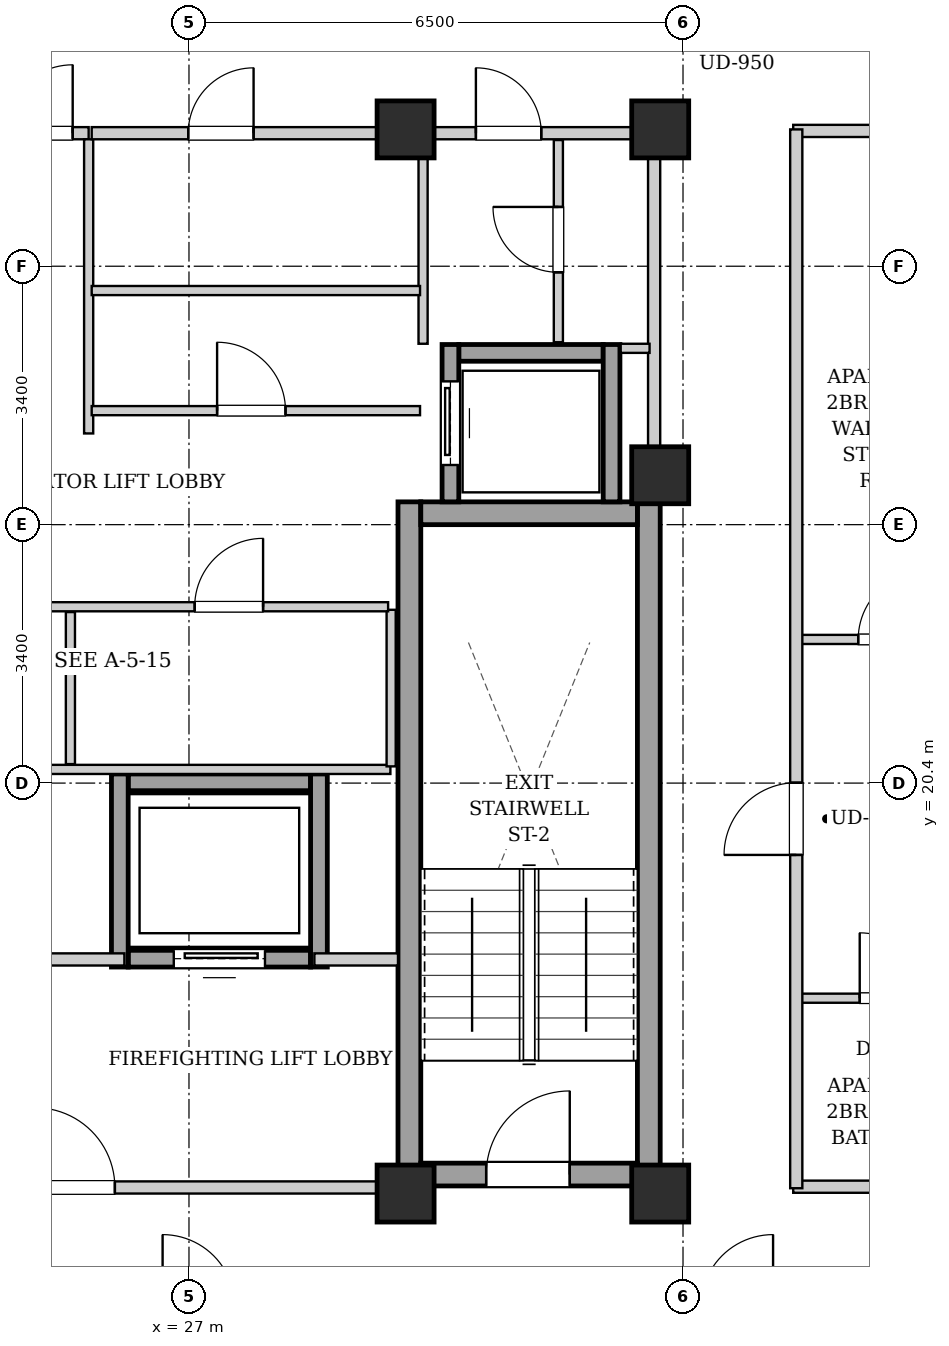
"""IFC4 building model, lengths in metres.
Left out: names, types, materials, properties, quantities, classifications, styles, units other than length and angle.
Written with IfcOpenShell. Run it as: python <this file> out.ifc"""

import sys

from ifc_helpers import new_model, si_unit, direction, frame, frame_2d, origin, origin_2d, place, context, subcontext, project, spatial, rectangle, extrude, element, fill, save


model = new_model("IFC4")
c1 = context("Model", 3, precision=1e-05, world=origin(), true_north=direction((0.0, 1.0)))
c2 = subcontext(c1, "Body", "Model", "MODEL_VIEW")
j1 = project(units=[si_unit("LENGTHUNIT", "METRE"), si_unit("PLANEANGLEUNIT", "RADIAN")], contexts=[c1])
p1 = place(None, origin())
s1 = spatial("IfcSite", under=j1, at=p1, CompositionType="ELEMENT")
p2 = place(p1, origin())
s2 = spatial("IfcBuilding", under=s1, at=p2, CompositionType="ELEMENT")
p3 = place(p2, frame((0.0, 0.0, 251.3)))
s3 = spatial("IfcBuildingStorey", under=s2, at=p3, CompositionType="ELEMENT", Elevation=251.3)
for number, where, z_axis, x_axis in (
    (1, (29.85, 15.0, 0.0), (0.0, 0.0, 1.0), (1.0, 0.0, 0.0)),
    (2, (33.2, 15.0, 0.0), (0.0, 0.0, 1.0), (1.0, 0.0, 0.0)),
    (3, (29.85, 29.0, 0.0), (0.0, 0.0, 1.0), (1.0, 0.0, 0.0)),
    (4, (33.2, 29.0, 0.0), (0.0, 0.0, 1.0), (1.0, 0.0, 0.0)),
    (5, (33.2, 24.45, 0.0), (0.0, 0.0, 1.0), (1.0, 0.0, 0.0)),
):
    element("IfcColumn", number, at=place(p3, frame(where, z_axis=z_axis, x_axis=x_axis)), inside=s3, PredefinedType="COLUMN", context=c2, shape_type="SweptSolid", body=[
        extrude(rectangle(XDim=0.75, YDim=0.75, at=origin_2d()), origin(), (0.0, 0.0, 1.0), 3.4),
    ])
for number, where, z_axis, x_axis in (
    (6, (29.9, 15.1, 0.0), (0.0, 0.0, 1.0), (0.0, 1.0, 0.0)),
    (7, (33.05, 15.1, 0.0), (0.0, 0.0, 1.0), (0.0, 1.0, 0.0)),
):
    element("IfcWall", number, at=place(p3, frame(where, z_axis=z_axis, x_axis=x_axis)), inside=s3, PredefinedType="SHEAR", context=c2, shape_type="SweptSolid", body=[
        extrude(rectangle(XDim=9.0, YDim=0.3, at=frame_2d((4.5, 0.0))), origin(), (0.0, 0.0, 1.0), 3.14),
    ])
p4 = place(p3, frame((30.05, 23.95, 0.0), z_axis=(0.0, 0.0, 1.0), x_axis=(1.0, 0.0, 0.0)))
e8 = element("IfcWall", 8, at=p4, inside=s3, PredefinedType="SHEAR", context=c2, shape_type="SweptSolid", body=[
    extrude(rectangle(XDim=2.85, YDim=0.3, at=frame_2d((1.425, 0.0))), origin(), (0.0, 0.0, 1.0), 3.14),
])
p5 = place(p3, frame((30.05, 15.25, 0.0), z_axis=(0.0, 0.0, 1.0), x_axis=(1.0, 0.0, 0.0)))
e9 = element("IfcWall", 9, at=p5, inside=s3, PredefinedType="SHEAR", context=c2, shape_type="SweptSolid", body=[
    extrude(rectangle(XDim=2.85, YDim=0.3, at=frame_2d((1.425, 0.0))), origin(), (0.0, 0.0, 1.0), 3.14),
])
p6 = place(p5, frame((0.86, 0.0, 0.0)))
e10 = element("IfcOpeningElement", 10, at=p6, cuts=e9, PredefinedType="OPENING", context=c2, shape_type="SweptSolid", body=[
    extrude(rectangle(XDim=1.1, YDim=2.05, at=frame_2d((0.55, 1.025))), frame((0.0, 0.16, 0.0), z_axis=(0.0, -1.0, 0.0), x_axis=(1.0, 0.0, 0.0)), (0.0, 0.0, 1.0), 0.32),
])
p7 = place(p3, frame((30.55, 26.06, 0.0), z_axis=(0.0, 0.0, 1.0), x_axis=(1.0, 0.0, 0.0)))
e11 = element("IfcWall", 11, at=p7, inside=s3, PredefinedType="SHEAR", context=c2, shape_type="SweptSolid", body=[
    extrude(rectangle(XDim=1.9, YDim=0.22, at=frame_2d((0.95, 0.0))), origin(), (0.0, 0.0, 1.0), 3.14),
])
p8 = place(p3, frame((30.44, 24.1, 0.0), z_axis=(0.0, 0.0, 1.0), x_axis=(0.0, 1.0, 0.0)))
e12 = element("IfcWall", 12, at=p8, inside=s3, PredefinedType="SHEAR", context=c2, shape_type="SweptSolid", body=[
    extrude(rectangle(XDim=2.07, YDim=0.22, at=frame_2d((1.035, 0.0))), origin(), (0.0, 0.0, 1.0), 3.14),
])
p9 = place(p8, frame((0.485, 0.0, 0.0)))
e13 = element("IfcOpeningElement", 13, at=p9, cuts=e12, PredefinedType="OPENING", context=c2, shape_type="SweptSolid", body=[
    extrude(rectangle(XDim=1.1, YDim=2.15, at=frame_2d((0.55, 1.075))), frame((0.0, 0.12, 0.0), z_axis=(0.0, -1.0, 0.0), x_axis=(1.0, 0.0, 0.0)), (0.0, 0.0, 1.0), 0.24),
])
p10 = place(p3, frame((32.56, 24.1, 0.0), z_axis=(0.0, 0.0, 1.0), x_axis=(0.0, 1.0, 0.0)))
e14 = element("IfcWall", 14, at=p10, inside=s3, PredefinedType="SHEAR", context=c2, shape_type="SweptSolid", body=[
    extrude(rectangle(XDim=2.07, YDim=0.22, at=frame_2d((1.035, 0.0))), origin(), (0.0, 0.0, 1.0), 3.14),
])
p11 = place(p3, frame((26.2, 18.09, 0.0), z_axis=(0.0, 0.0, 1.0), x_axis=(1.0, 0.0, 0.0)))
e15 = element("IfcWall", 15, at=p11, inside=s3, PredefinedType="SHEAR", context=c2, shape_type="SweptSolid", body=[
    extrude(rectangle(XDim=2.4, YDim=0.22, at=frame_2d((1.2, 0.0))), origin(), (0.0, 0.0, 1.0), 3.14),
])
p12 = place(p11, frame((0.6, 0.0, 0.0)))
e16 = element("IfcOpeningElement", 16, at=p12, cuts=e15, PredefinedType="OPENING", context=c2, shape_type="SweptSolid", body=[
    extrude(rectangle(XDim=1.2, YDim=2.15, at=frame_2d((0.6, 1.075))), frame((0.0, 0.12, 0.0), z_axis=(0.0, -1.0, 0.0), x_axis=(1.0, 0.0, 0.0)), (0.0, 0.0, 1.0), 0.24),
])
p13 = place(p3, frame((26.2, 20.41, 0.0), z_axis=(0.0, 0.0, 1.0), x_axis=(1.0, 0.0, 0.0)))
e17 = element("IfcWall", 17, at=p13, inside=s3, PredefinedType="SHEAR", context=c2, shape_type="SweptSolid", body=[
    extrude(rectangle(XDim=2.4, YDim=0.22, at=frame_2d((1.2, 0.0))), origin(), (0.0, 0.0, 1.0), 3.14),
])
for number, where, z_axis, x_axis in (
    (18, (26.09, 17.98, 0.0), (0.0, 0.0, 1.0), (0.0, 1.0, 0.0)),
    (19, (28.71, 17.98, 0.0), (0.0, 0.0, 1.0), (0.0, 1.0, 0.0)),
):
    element("IfcWall", number, at=place(p3, frame(where, z_axis=z_axis, x_axis=x_axis)), inside=s3, PredefinedType="SHEAR", context=c2, shape_type="SweptSolid", body=[
        extrude(rectangle(XDim=2.54, YDim=0.22, at=frame_2d((1.27, 0.0))), origin(), (0.0, 0.0, 1.0), 3.14),
    ])
p14 = place(p3, frame((21.25, 15.08, 0.0), z_axis=(0.0, 0.0, 1.0), x_axis=(1.0, 0.0, 0.0)))
e20 = element("IfcWall", 20, at=p14, inside=s3, PredefinedType="PARTITIONING", context=c2, shape_type="SweptSolid", body=[
    extrude(rectangle(XDim=8.5, YDim=0.16, at=frame_2d((4.25, 0.0))), origin(), (0.0, 0.0, 1.0), 2.668),
])
p15 = place(p14, frame((3.725, 0.0, 0.0)))
e21 = element("IfcOpeningElement", 21, at=p15, cuts=e20, PredefinedType="OPENING", context=c2, shape_type="SweptSolid", body=[
    extrude(rectangle(XDim=1.05, YDim=2.05, at=frame_2d((0.525, 1.025))), frame((0.0, 0.09, 0.0), z_axis=(0.0, -1.0, 0.0), x_axis=(1.0, 0.0, 0.0)), (0.0, 0.0, 1.0), 0.18),
])
p16 = place(p3, frame((24.85, 18.08, 0.0), z_axis=(0.0, 0.0, 1.0), x_axis=(1.0, 0.0, 0.0)))
e22 = element("IfcWall", 22, at=p16, inside=s3, PredefinedType="PARTITIONING", context=c2, shape_type="SweptSolid", body=[
    extrude(rectangle(XDim=1.3, YDim=0.16, at=frame_2d((0.65, 0.0))), origin(), (0.0, 0.0, 1.0), 3.14),
])
p17 = place(p3, frame((28.65, 18.08, 0.0), z_axis=(0.0, 0.0, 1.0), x_axis=(1.0, 0.0, 0.0)))
e23 = element("IfcWall", 23, at=p17, inside=s3, PredefinedType="PARTITIONING", context=c2, shape_type="SweptSolid", body=[
    extrude(rectangle(XDim=1.1, YDim=0.16, at=frame_2d((0.55, 0.0))), origin(), (0.0, 0.0, 1.0), 3.14),
])
p18 = place(p3, frame((33.12, 24.12, 0.0), z_axis=(0.0, 0.0, 1.0), x_axis=(0.0, 1.0, 0.0)))
e24 = element("IfcWall", 24, at=p18, inside=s3, PredefinedType="PARTITIONING", context=c2, shape_type="SweptSolid", body=[
    extrude(rectangle(XDim=4.76, YDim=0.16, at=frame_2d((2.38, 0.0))), origin(), (0.0, 0.0, 1.0), 3.14),
])
p19 = place(p3, frame((24.36, 28.95, 0.0), z_axis=(0.0, 0.0, 1.0), x_axis=(1.0, 0.0, 0.0)))
e25 = element("IfcWall", 25, at=p19, inside=s3, PredefinedType="PARTITIONING", context=c2, shape_type="SweptSolid", body=[
    extrude(rectangle(XDim=1.32, YDim=0.16, at=frame_2d((0.66, 0.0))), origin(), (0.0, 0.0, 1.0), 2.668),
])
p20 = place(p19, frame((0.21, 0.0, 0.0)))
e26 = element("IfcOpeningElement", 26, at=p20, cuts=e25, PredefinedType="OPENING", context=c2, shape_type="SweptSolid", body=[
    extrude(rectangle(XDim=0.9, YDim=2.05, at=frame_2d((0.45, 1.025))), frame((0.0, 0.09, 0.0), z_axis=(0.0, -1.0, 0.0), x_axis=(1.0, 0.0, 0.0)), (0.0, 0.0, 1.0), 0.18),
])
p21 = place(p3, frame((25.68, 25.0, 0.0), z_axis=(0.0, 0.0, 1.0), x_axis=(0.0, 1.0, 0.0)))
e27 = element("IfcWall", 27, at=p21, inside=s3, PredefinedType="PARTITIONING", context=c2, shape_type="SweptSolid", body=[
    extrude(rectangle(XDim=3.87, YDim=0.12, at=frame_2d((1.935, 0.0))), origin(), (0.0, 0.0, 1.0), 3.14),
])
p22 = place(p3, frame((30.08, 26.18, 0.0), z_axis=(0.0, 0.0, 1.0), x_axis=(0.0, 1.0, 0.0)))
e28 = element("IfcWall", 28, at=p22, inside=s3, PredefinedType="PARTITIONING", context=c2, shape_type="SweptSolid", body=[
    extrude(rectangle(XDim=2.68, YDim=0.12, at=frame_2d((1.34, 0.0))), origin(), (0.0, 0.0, 1.0), 3.14),
])
p23 = place(p3, frame((32.68, 26.12, 0.0), z_axis=(0.0, 0.0, 1.0), x_axis=(1.0, 0.0, 0.0)))
e29 = element("IfcWall", 29, at=p23, inside=s3, PredefinedType="PARTITIONING", context=c2, shape_type="SweptSolid", body=[
    extrude(rectangle(XDim=0.38, YDim=0.12, at=frame_2d((0.19, 0.0))), origin(), (0.0, 0.0, 1.0), 3.14),
])
p24 = place(p3, frame((31.86, 26.2, 0.0), z_axis=(0.0, 0.0, 1.0), x_axis=(0.0, 1.0, 0.0)))
e30 = element("IfcWall", 30, at=p24, inside=s3, PredefinedType="PARTITIONING", context=c2, shape_type="SweptSolid", body=[
    extrude(rectangle(XDim=2.66, YDim=0.12, at=frame_2d((1.33, 0.0))), origin(), (0.0, 0.0, 1.0), 3.14),
])
p25 = place(p24, frame((0.92, 0.0, 0.0)))
e31 = element("IfcOpeningElement", 31, at=p25, cuts=e30, PredefinedType="OPENING", context=c2, shape_type="SweptSolid", body=[
    extrude(rectangle(XDim=0.86, YDim=2.05, at=frame_2d((0.43, 1.025))), frame((0.0, 0.07, 0.0), z_axis=(0.0, -1.0, 0.0), x_axis=(1.0, 0.0, 0.0)), (0.0, 0.0, 1.0), 0.14),
])
p26 = place(p3, frame((30.08, 28.95, 0.0), z_axis=(0.0, 0.0, 1.0), x_axis=(1.0, 0.0, 0.0)))
e32 = element("IfcWall", 32, at=p26, inside=s3, PredefinedType="PARTITIONING", context=c2, shape_type="SweptSolid", body=[
    extrude(rectangle(XDim=2.96, YDim=0.16, at=frame_2d((1.48, 0.0))), origin(), (0.0, 0.0, 1.0), 3.14),
])
p27 = place(p26, frame((0.695, 0.0, 0.0)))
e33 = element("IfcOpeningElement", 33, at=p27, cuts=e32, PredefinedType="OPENING", context=c2, shape_type="SweptSolid", body=[
    extrude(rectangle(XDim=0.86, YDim=2.05, at=frame_2d((0.43, 1.025))), frame((0.0, 0.09, 0.0), z_axis=(0.0, -1.0, 0.0), x_axis=(1.0, 0.0, 0.0)), (0.0, 0.0, 1.0), 0.18),
])
p28 = place(p3, frame((25.72, 26.88, 0.0), z_axis=(0.0, 0.0, 1.0), x_axis=(1.0, 0.0, 0.0)))
e34 = element("IfcWall", 34, at=p28, inside=s3, PredefinedType="PARTITIONING", context=c2, shape_type="SweptSolid", body=[
    extrude(rectangle(XDim=4.32, YDim=0.12, at=frame_2d((2.16, 0.0))), origin(), (0.0, 0.0, 1.0), 3.14),
])
p29 = place(p3, frame((25.72, 25.3, 0.0), z_axis=(0.0, 0.0, 1.0), x_axis=(1.0, 0.0, 0.0)))
e35 = element("IfcWall", 35, at=p29, inside=s3, PredefinedType="PARTITIONING", context=c2, shape_type="SweptSolid", body=[
    extrude(rectangle(XDim=4.32, YDim=0.12, at=frame_2d((2.16, 0.0))), origin(), (0.0, 0.0, 1.0), 3.14),
])
p30 = place(p29, frame((1.65, 0.0, 0.0)))
e36 = element("IfcOpeningElement", 36, at=p30, cuts=e35, PredefinedType="OPENING", context=c2, shape_type="SweptSolid", body=[
    extrude(rectangle(XDim=0.9, YDim=2.05, at=frame_2d((0.45, 1.025))), frame((0.0, 0.07, 0.0), z_axis=(0.0, -1.0, 0.0), x_axis=(1.0, 0.0, 0.0)), (0.0, 0.0, 1.0), 0.14),
])
p31 = place(p3, frame((25.72, 28.95, 0.0), z_axis=(0.0, 0.0, 1.0), x_axis=(1.0, 0.0, 0.0)))
e37 = element("IfcWall", 37, at=p31, inside=s3, PredefinedType="PARTITIONING", context=c2, shape_type="SweptSolid", body=[
    extrude(rectangle(XDim=4.32, YDim=0.16, at=frame_2d((2.16, 0.0))), origin(), (0.0, 0.0, 1.0), 2.668),
])
p32 = place(p31, frame((1.27, 0.0, 0.0)))
e38 = element("IfcOpeningElement", 38, at=p32, cuts=e37, PredefinedType="OPENING", context=c2, shape_type="SweptSolid", body=[
    extrude(rectangle(XDim=0.86, YDim=2.05, at=frame_2d((0.43, 1.025))), frame((0.0, 0.09, 0.0), z_axis=(0.0, -1.0, 0.0), x_axis=(1.0, 0.0, 0.0)), (0.0, 0.0, 1.0), 0.18),
])
p33 = place(p3, frame((22.3, 20.58, 0.0), z_axis=(0.0, 0.0, 1.0), x_axis=(1.0, 0.0, 0.0)))
e39 = element("IfcWall", 39, at=p33, inside=s3, PredefinedType="PARTITIONING", context=c2, shape_type="SweptSolid", body=[
    extrude(rectangle(XDim=7.35, YDim=0.12, at=frame_2d((3.675, 0.0))), origin(), (0.0, 0.0, 1.0), 3.14),
])
p34 = place(p3, frame((29.66, 20.62, 0.0), z_axis=(0.0, 0.0, 1.0), x_axis=(0.0, 1.0, 0.0)))
e40 = element("IfcWall", 40, at=p34, inside=s3, PredefinedType="PARTITIONING", context=c2, shape_type="SweptSolid", body=[
    extrude(rectangle(XDim=2.06, YDim=0.12, at=frame_2d((1.03, 0.0))), origin(), (0.0, 0.0, 1.0), 3.14),
])
p35 = place(p3, frame((25.44, 20.65, 0.0), z_axis=(0.0, 0.0, 1.0), x_axis=(0.0, 1.0, 0.0)))
e41 = element("IfcWall", 41, at=p35, inside=s3, PredefinedType="PARTITIONING", context=c2, shape_type="SweptSolid", body=[
    extrude(rectangle(XDim=2.0, YDim=0.12, at=frame_2d((1.0, 0.0))), origin(), (0.0, 0.0, 1.0), 3.14),
])
p36 = place(p3, frame((22.35, 22.72, 0.0), z_axis=(0.0, 0.0, 1.0), x_axis=(1.0, 0.0, 0.0)))
e42 = element("IfcWall", 42, at=p36, inside=s3, PredefinedType="PARTITIONING", context=c2, shape_type="SweptSolid", body=[
    extrude(rectangle(XDim=7.27, YDim=0.12, at=frame_2d((3.635, 0.0))), origin(), (0.0, 0.0, 1.0), 3.14),
])
p37 = place(p36, frame((1.175, 0.0, 0.0)))
e43 = element("IfcOpeningElement", 43, at=p37, cuts=e42, PredefinedType="OPENING", context=c2, shape_type="SweptSolid", body=[
    extrude(rectangle(XDim=0.9, YDim=2.05, at=frame_2d((0.45, 1.025))), frame((0.0, 0.07, 0.0), z_axis=(0.0, -1.0, 0.0), x_axis=(1.0, 0.0, 0.0)), (0.0, 0.0, 1.0), 0.14),
])
p38 = place(p36, frame((4.725, 0.0, 0.0)))
e44 = element("IfcOpeningElement", 44, at=p38, cuts=e42, PredefinedType="OPENING", context=c2, shape_type="SweptSolid", body=[
    extrude(rectangle(XDim=0.9, YDim=2.05, at=frame_2d((0.45, 1.025))), frame((0.0, 0.07, 0.0), z_axis=(0.0, -1.0, 0.0), x_axis=(1.0, 0.0, 0.0)), (0.0, 0.0, 1.0), 0.14),
])
for number, where, z_axis, x_axis in (
    (45, (34.95, 15.09, 0.0), (0.0, 0.0, 1.0), (1.0, 0.0, 0.0)),
    (46, (34.95, 28.98, 0.0), (0.0, 0.0, 1.0), (1.0, 0.0, 0.0)),
):
    element("IfcWall", number, at=place(p3, frame(where, z_axis=z_axis, x_axis=x_axis)), inside=s3, PredefinedType="PARTITIONING", context=c2, shape_type="SweptSolid", body=[
        extrude(rectangle(XDim=5.07, YDim=0.16, at=frame_2d((2.535, 0.0))), origin(), (0.0, 0.0, 1.0), 2.668),
    ])
p39 = place(p3, frame((35.03, 22.29, 0.0), z_axis=(0.0, 0.0, 1.0), x_axis=(1.0, 0.0, 0.0)))
e47 = element("IfcWall", 47, at=p39, inside=s3, PredefinedType="PARTITIONING", context=c2, shape_type="SweptSolid", body=[
    extrude(rectangle(XDim=2.45, YDim=0.12, at=frame_2d((1.225, 0.0))), origin(), (0.0, 0.0, 1.0), 3.14),
])
p40 = place(p39, frame((0.775, 0.0, 0.0)))
e48 = element("IfcOpeningElement", 48, at=p40, cuts=e47, PredefinedType="OPENING", context=c2, shape_type="SweptSolid", body=[
    extrude(rectangle(XDim=0.9, YDim=2.05, at=frame_2d((0.45, 1.025))), frame((0.0, 0.07, 0.0), z_axis=(0.0, -1.0, 0.0), x_axis=(1.0, 0.0, 0.0)), (0.0, 0.0, 1.0), 0.14),
])
p41 = place(p3, frame((35.03, 17.57, 0.0), z_axis=(0.0, 0.0, 1.0), x_axis=(1.0, 0.0, 0.0)))
e49 = element("IfcWall", 49, at=p41, inside=s3, PredefinedType="PARTITIONING", context=c2, shape_type="SweptSolid", body=[
    extrude(rectangle(XDim=2.45, YDim=0.12, at=frame_2d((1.225, 0.0))), origin(), (0.0, 0.0, 1.0), 3.14),
])
p42 = place(p41, frame((0.795, 0.0, 0.0)))
e50 = element("IfcOpeningElement", 50, at=p42, cuts=e49, PredefinedType="OPENING", context=c2, shape_type="SweptSolid", body=[
    extrude(rectangle(XDim=0.86, YDim=2.05, at=frame_2d((0.43, 1.025))), frame((0.0, 0.07, 0.0), z_axis=(0.0, -1.0, 0.0), x_axis=(1.0, 0.0, 0.0)), (0.0, 0.0, 1.0), 0.14),
])
p43 = place(p3, frame((34.99, 15.07, 0.0), z_axis=(0.0, 0.0, 1.0), x_axis=(0.0, 1.0, 0.0)))
e51 = element("IfcWall", 51, at=p43, inside=s3, PredefinedType="PARTITIONING", context=c2, shape_type="SweptSolid", body=[
    extrude(rectangle(XDim=13.93, YDim=0.16, at=frame_2d((6.965, 0.0))), origin(), (0.0, 0.0, 1.0), 3.14),
])
p44 = place(p43, frame((4.385, 0.0, 0.0)))
e52 = element("IfcOpeningElement", 52, at=p44, cuts=e51, PredefinedType="OPENING", context=c2, shape_type="SweptSolid", body=[
    extrude(rectangle(XDim=0.95, YDim=2.1, at=frame_2d((0.475, 1.05))), frame((0.0, 0.09, 0.0), z_axis=(0.0, -1.0, 0.0), x_axis=(1.0, 0.0, 0.0)), (0.0, 0.0, 1.0), 0.18),
])
p45 = place(p6, origin())
e53 = element("IfcDoor", 53, at=p45, inside=s3, OperationType="SINGLE_SWING_RIGHT", PredefinedType="DOOR", context=c2, shape_type="SweptSolid", body=[
    extrude(rectangle(XDim=1.1, YDim=2.05, at=frame_2d((0.55, 1.025))), frame((0.0, 0.025, 0.0), z_axis=(0.0, -1.0, 0.0), x_axis=(1.0, 0.0, 0.0)), (0.0, 0.0, 1.0), 0.05),
])
fill(e10, e53)
p46 = place(p9, origin())
e54 = element("IfcDoor", 54, at=p46, inside=s3, OperationType="SLIDING_TO_LEFT", PredefinedType="DOOR", context=c2, shape_type="SweptSolid", body=[
    extrude(rectangle(XDim=1.1, YDim=2.15, at=frame_2d((0.55, 1.075))), frame((0.0, 0.025, 0.0), z_axis=(0.0, -1.0, 0.0), x_axis=(1.0, 0.0, 0.0)), (0.0, 0.0, 1.0), 0.05),
])
fill(e13, e54)
p47 = place(p12, origin())
e55 = element("IfcDoor", 55, at=p47, inside=s3, OperationType="SLIDING_TO_LEFT", PredefinedType="DOOR", context=c2, shape_type="SweptSolid", body=[
    extrude(rectangle(XDim=1.2, YDim=2.15, at=frame_2d((0.6, 1.075))), frame((0.0, 0.025, 0.0), z_axis=(0.0, -1.0, 0.0), x_axis=(1.0, 0.0, 0.0)), (0.0, 0.0, 1.0), 0.05),
])
fill(e16, e55)
p48 = place(p15, origin())
e56 = element("IfcDoor", 56, at=p48, inside=s3, OperationType="SINGLE_SWING_LEFT", PredefinedType="DOOR", context=c2, shape_type="SweptSolid", body=[
    extrude(rectangle(XDim=1.05, YDim=2.05, at=frame_2d((0.525, 1.025))), frame((0.0, 0.025, 0.0), z_axis=(0.0, -1.0, 0.0), x_axis=(1.0, 0.0, 0.0)), (0.0, 0.0, 1.0), 0.05),
])
fill(e21, e56)
p49 = place(p20, origin())
e57 = element("IfcDoor", 57, at=p49, inside=s3, OperationType="SINGLE_SWING_RIGHT", PredefinedType="DOOR", context=c2, shape_type="SweptSolid", body=[
    extrude(rectangle(XDim=0.9, YDim=2.05, at=frame_2d((0.45, 1.025))), frame((0.0, 0.025, 0.0), z_axis=(0.0, -1.0, 0.0), x_axis=(1.0, 0.0, 0.0)), (0.0, 0.0, 1.0), 0.05),
])
fill(e26, e57)
p50 = place(p25, origin())
e58 = element("IfcDoor", 58, at=p50, inside=s3, OperationType="SINGLE_SWING_RIGHT", PredefinedType="DOOR", context=c2, shape_type="SweptSolid", body=[
    extrude(rectangle(XDim=0.86, YDim=2.05, at=frame_2d((0.43, 1.025))), frame((0.0, 0.025, 0.0), z_axis=(0.0, -1.0, 0.0), x_axis=(1.0, 0.0, 0.0)), (0.0, 0.0, 1.0), 0.05),
])
fill(e31, e58)
p51 = place(p27, origin())
e59 = element("IfcDoor", 59, at=p51, inside=s3, OperationType="SINGLE_SWING_LEFT", PredefinedType="DOOR", context=c2, shape_type="SweptSolid", body=[
    extrude(rectangle(XDim=0.86, YDim=2.05, at=frame_2d((0.43, 1.025))), frame((0.0, 0.025, 0.0), z_axis=(0.0, -1.0, 0.0), x_axis=(1.0, 0.0, 0.0)), (0.0, 0.0, 1.0), 0.05),
])
fill(e33, e59)
p52 = place(p30, origin())
e60 = element("IfcDoor", 60, at=p52, inside=s3, OperationType="SINGLE_SWING_LEFT", PredefinedType="DOOR", context=c2, shape_type="SweptSolid", body=[
    extrude(rectangle(XDim=0.9, YDim=2.05, at=frame_2d((0.45, 1.025))), frame((0.0, 0.025, 0.0), z_axis=(0.0, -1.0, 0.0), x_axis=(1.0, 0.0, 0.0)), (0.0, 0.0, 1.0), 0.05),
])
fill(e36, e60)
p53 = place(p32, origin())
e61 = element("IfcDoor", 61, at=p53, inside=s3, OperationType="SINGLE_SWING_RIGHT", PredefinedType="DOOR", context=c2, shape_type="SweptSolid", body=[
    extrude(rectangle(XDim=0.86, YDim=2.05, at=frame_2d((0.43, 1.025))), frame((0.0, 0.025, 0.0), z_axis=(0.0, -1.0, 0.0), x_axis=(1.0, 0.0, 0.0)), (0.0, 0.0, 1.0), 0.05),
])
fill(e38, e61)
p54 = place(p38, origin())
e62 = element("IfcDoor", 62, at=p54, inside=s3, OperationType="SINGLE_SWING_RIGHT", PredefinedType="DOOR", context=c2, shape_type="SweptSolid", body=[
    extrude(rectangle(XDim=0.9, YDim=2.05, at=frame_2d((0.45, 1.025))), frame((0.0, 0.025, 0.0), z_axis=(0.0, -1.0, 0.0), x_axis=(1.0, 0.0, 0.0)), (0.0, 0.0, 1.0), 0.05),
])
fill(e44, e62)
p55 = place(p40, origin())
e63 = element("IfcDoor", 63, at=p55, inside=s3, OperationType="SINGLE_SWING_RIGHT", PredefinedType="DOOR", context=c2, shape_type="SweptSolid", body=[
    extrude(rectangle(XDim=0.9, YDim=2.05, at=frame_2d((0.45, 1.025))), frame((0.0, 0.025, 0.0), z_axis=(0.0, -1.0, 0.0), x_axis=(1.0, 0.0, 0.0)), (0.0, 0.0, 1.0), 0.05),
])
fill(e48, e63)
p56 = place(p42, origin())
e64 = element("IfcDoor", 64, at=p56, inside=s3, OperationType="SINGLE_SWING_LEFT", PredefinedType="DOOR", context=c2, shape_type="SweptSolid", body=[
    extrude(rectangle(XDim=0.86, YDim=2.05, at=frame_2d((0.43, 1.025))), frame((0.0, 0.025, 0.0), z_axis=(0.0, -1.0, 0.0), x_axis=(1.0, 0.0, 0.0)), (0.0, 0.0, 1.0), 0.05),
])
fill(e50, e64)
p57 = place(p44, origin())
e65 = element("IfcDoor", 65, at=p57, inside=s3, OperationType="SINGLE_SWING_LEFT", PredefinedType="DOOR", context=c2, shape_type="SweptSolid", body=[
    extrude(rectangle(XDim=0.95, YDim=2.1, at=frame_2d((0.475, 1.05))), frame((0.0, 0.025, 0.0), z_axis=(0.0, -1.0, 0.0), x_axis=(1.0, 0.0, 0.0)), (0.0, 0.0, 1.0), 0.05),
])
fill(e52, e65)
save(model, sys.argv[1])
